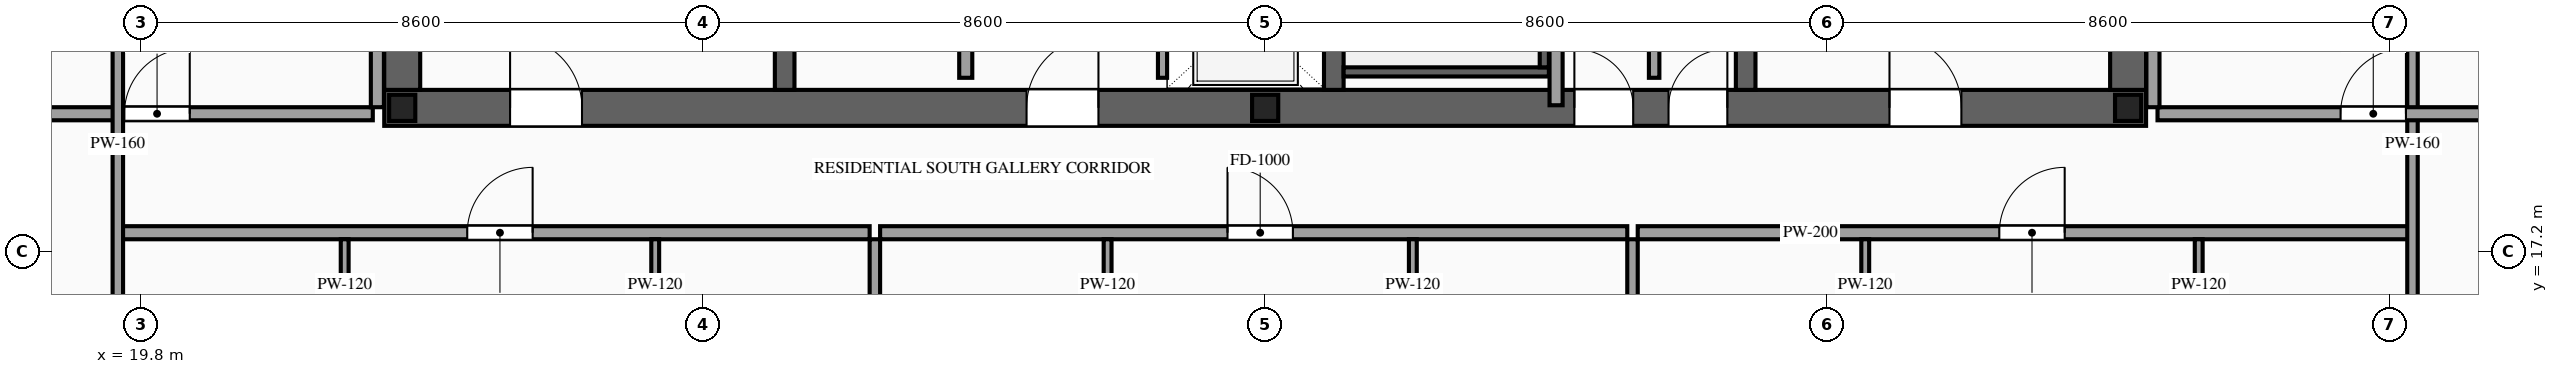
"""IFC4 building model, lengths in metres.
Left out: names, types, materials, properties, quantities, classifications, styles, units other than length and angle.
Written with IfcOpenShell. Run it as: python <this file> out.ifc"""

import sys

from ifc_helpers import new_model, si_unit, direction, frame, frame_2d, origin, origin_2d, place, context, subcontext, project, spatial, rectangle, i_section, extrude, source, transform, mapped, element, fill, save


model = new_model("IFC4")
c1 = context("Model", 3, precision=1e-05, world=origin(), true_north=direction((0.0, 1.0)))
c2 = subcontext(c1, "Body", "Model", "MODEL_VIEW")
j1 = project(units=[si_unit("LENGTHUNIT", "METRE"), si_unit("PLANEANGLEUNIT", "RADIAN")], contexts=[c1])
p1 = place(None, origin())
s1 = spatial("IfcSite", under=j1, at=p1, CompositionType="ELEMENT")
p2 = place(p1, origin())
s2 = spatial("IfcBuilding", under=s1, at=p2, CompositionType="ELEMENT")
p3 = place(p2, frame((0.0, 0.0, 241.6)))
s3 = spatial("IfcBuildingStorey", under=s2, at=p3, CompositionType="ELEMENT", Elevation=241.6)
p4 = place(p3, frame((23.525, 19.4, 0.0), z_axis=(0.0, 0.0, 1.0), x_axis=(1.0, 0.0, 0.0)))
e1 = element("IfcWall", 1, at=p4, inside=s3, PredefinedType="SHEAR", context=c2, shape_type="SweptSolid", body=[
    extrude(rectangle(XDim=26.95, YDim=0.55, at=frame_2d((13.475, 0.0))), origin(), (0.0, 0.0, 1.0), 3.5),
])
p5 = place(p4, frame((1.925, 0.0, 0.0)))
e2 = element("IfcOpeningElement", 2, at=p5, cuts=e1, PredefinedType="OPENING", context=c2, shape_type="SweptSolid", body=[
    extrude(rectangle(XDim=1.1, YDim=2.2, at=frame_2d((0.55, 1.1))), frame((0.0, 0.29, 0.0), z_axis=(0.0, -1.0, 0.0), x_axis=(1.0, 0.0, 0.0)), (0.0, 0.0, 1.0), 0.58),
])
p6 = place(p4, frame((9.825, 0.0, 0.0)))
e3 = element("IfcOpeningElement", 3, at=p6, cuts=e1, PredefinedType="OPENING", context=c2, shape_type="SweptSolid", body=[
    extrude(rectangle(XDim=1.1, YDim=2.2, at=frame_2d((0.55, 1.1))), frame((0.0, 0.29, 0.0), z_axis=(0.0, -1.0, 0.0), x_axis=(1.0, 0.0, 0.0)), (0.0, 0.0, 1.0), 0.58),
])
p7 = place(p4, frame((23.025, 0.0, 0.0)))
e4 = element("IfcOpeningElement", 4, at=p7, cuts=e1, PredefinedType="OPENING", context=c2, shape_type="SweptSolid", body=[
    extrude(rectangle(XDim=1.1, YDim=2.2, at=frame_2d((0.55, 1.1))), frame((0.0, 0.29, 0.0), z_axis=(0.0, -1.0, 0.0), x_axis=(1.0, 0.0, 0.0)), (0.0, 0.0, 1.0), 0.58),
])
p8 = place(p4, frame((19.645, 0.0, 0.0)))
e5 = element("IfcOpeningElement", 5, at=p8, cuts=e1, PredefinedType="OPENING", context=c2, shape_type="SweptSolid", body=[
    extrude(rectangle(XDim=0.9, YDim=2.15, at=frame_2d((0.45, 1.075))), frame((0.0, 0.29, 0.0), z_axis=(0.0, -1.0, 0.0), x_axis=(1.0, 0.0, 0.0)), (0.0, 0.0, 1.0), 0.58),
])
p9 = place(p4, frame((18.205, 0.0, 0.0)))
e6 = element("IfcOpeningElement", 6, at=p9, cuts=e1, PredefinedType="OPENING", context=c2, shape_type="SweptSolid", body=[
    extrude(rectangle(XDim=0.9, YDim=2.15, at=frame_2d((0.45, 1.075))), frame((0.0, 0.29, 0.0), z_axis=(0.0, -1.0, 0.0), x_axis=(1.0, 0.0, 0.0)), (0.0, 0.0, 1.0), 0.58),
])
m1 = source(origin(), c2, "Body", "SweptSolid", [
    extrude(rectangle(XDim=12.25, YDim=0.55, at=frame_2d((6.125, 0.0))), origin(), (0.0, 0.0, 1.0), 3.5),
])
for number, where, z_axis, x_axis in (
    (7, (23.8, 19.675, 0.0), (0.0, 0.0, 1.0), (0.0, 1.0, 0.0)),
    (8, (50.2, 19.675, 0.0), (0.0, 0.0, 1.0), (0.0, 1.0, 0.0)),
):
    element("IfcWall", number, at=place(p3, frame(where, z_axis=z_axis, x_axis=x_axis)), inside=s3, PredefinedType="SHEAR", context=c2, shape_type="MappedRepresentation", body=[
        mapped(m1, transform((0.0, 0.0, 0.0), scale=1.0)),
    ])
m2 = source(origin(), c2, "Body", "SweptSolid", [
    extrude(rectangle(XDim=12.25, YDim=0.3, at=frame_2d((6.125, 0.0))), origin(), (0.0, 0.0, 1.0), 3.5),
])
for number, where, z_axis, x_axis in (
    (9, (29.65, 19.675, 0.0), (0.0, 0.0, 1.0), (0.0, 1.0, 0.0)),
    (10, (38.05, 19.675, 0.0), (0.0, 0.0, 1.0), (0.0, 1.0, 0.0)),
    (11, (44.35, 19.675, 0.0), (0.0, 0.0, 1.0), (0.0, 1.0, 0.0)),
):
    element("IfcWall", number, at=place(p3, frame(where, z_axis=z_axis, x_axis=x_axis)), inside=s3, PredefinedType="SOLIDWALL", context=c2, shape_type="MappedRepresentation", body=[
        mapped(m2, transform((0.0, 0.0, 0.0), scale=1.0)),
    ])
m3 = source(origin(), c2, "Body", "SweptSolid", [
    extrude(i_section(OverallWidth=0.4, OverallDepth=0.4, WebThickness=0.013, FlangeThickness=0.021, at=origin_2d()), origin(), (0.0, 0.0, 1.0), 3.5),
])
for number, where, z_axis, x_axis in (
    (12, (23.8, 19.4, 0.0), (0.0, 0.0, 1.0), (1.0, 0.0, 0.0)),
    (13, (37.0, 19.4, 0.0), (0.0, 0.0, 1.0), (1.0, 0.0, 0.0)),
    (14, (50.2, 19.4, 0.0), (0.0, 0.0, 1.0), (1.0, 0.0, 0.0)),
):
    element("IfcColumn", number, at=place(p3, frame(where, z_axis=z_axis, x_axis=x_axis)), inside=s3, PredefinedType="COLUMN", context=c2, shape_type="MappedRepresentation", body=[
        mapped(m3, transform((0.0, 0.0, 0.0), scale=1.0)),
    ])
p10 = place(p3, frame((35.43, 19.86, 0.0), z_axis=(0.0, 0.0, 1.0), x_axis=(0.0, 1.0, 0.0)))
e15 = element("IfcWall", 15, at=p10, inside=s3, PredefinedType="SOLIDWALL", context=c2, shape_type="SweptSolid", body=[
    extrude(rectangle(XDim=2.04, YDim=0.14, at=frame_2d((1.02, 0.0))), origin(), (0.0, 0.0, 1.0), 3.28),
])
p11 = place(p10, frame((0.47, 0.0, 0.0)))
e16 = element("IfcOpeningElement", 16, at=p11, cuts=e15, PredefinedType="OPENING", context=c2, shape_type="SweptSolid", body=[
    extrude(rectangle(XDim=1.1, YDim=2.2, at=frame_2d((0.55, 1.1))), frame((0.0, 0.085, 0.0), z_axis=(0.0, -1.0, 0.0), x_axis=(1.0, 0.0, 0.0)), (0.0, 0.0, 1.0), 0.17),
])
m4 = source(origin(), c2, "Body", "SweptSolid", [
    extrude(rectangle(XDim=3.14, YDim=0.14, at=frame_2d((1.57, 0.0))), origin(), (0.0, 0.0, 1.0), 3.28),
])
p12 = place(p3, frame((38.2, 19.95, 0.0), z_axis=(0.0, 0.0, 1.0), x_axis=(1.0, 0.0, 0.0)))
e17 = element("IfcWall", 17, at=p12, inside=s3, PredefinedType="SOLIDWALL", context=c2, shape_type="MappedRepresentation", body=[
    mapped(m4, transform((0.0, 0.0, 0.0), scale=1.0)),
])
m5 = source(origin(), c2, "Body", "SweptSolid", [
    extrude(rectangle(XDim=8.94, YDim=0.14, at=frame_2d((4.47, 0.0))), origin(), (0.0, 0.0, 1.0), 3.28),
])
p13 = place(p3, frame((41.27, 20.02, 0.0), z_axis=(0.0, 0.0, 1.0), x_axis=(0.0, 1.0, 0.0)))
e18 = element("IfcWall", 18, at=p13, inside=s3, PredefinedType="SOLIDWALL", context=c2, shape_type="MappedRepresentation", body=[
    mapped(m5, transform((0.0, 0.0, 0.0), scale=1.0)),
])
p14 = place(p3, frame((32.42, 19.86, 0.0), z_axis=(0.0, 0.0, 1.0), x_axis=(0.0, 1.0, 0.0)))
e19 = element("IfcWall", 19, at=p14, inside=s3, PredefinedType="PARTITIONING", context=c2, shape_type="SweptSolid", body=[
    extrude(rectangle(XDim=7.94, YDim=0.2, at=frame_2d((3.97, 0.0))), origin(), (0.0, 0.0, 1.0), 3.28),
])
p15 = place(p14, frame((3.52, 0.0, 0.0)))
e20 = element("IfcOpeningElement", 20, at=p15, cuts=e19, PredefinedType="OPENING", context=c2, shape_type="SweptSolid", body=[
    extrude(rectangle(XDim=0.9, YDim=2.15, at=frame_2d((0.45, 1.075))), frame((0.0, 0.115, 0.0), z_axis=(0.0, -1.0, 0.0), x_axis=(1.0, 0.0, 0.0)), (0.0, 0.0, 1.0), 0.23),
])
m6 = source(origin(), c2, "Body", "SweptSolid", [
    extrude(rectangle(XDim=1.34, YDim=0.16, at=frame_2d((0.67, 0.0))), origin(), (0.0, 0.0, 1.0), 3.28),
])
p16 = place(p3, frame((42.95, 19.86, 0.0), z_axis=(0.0, 0.0, 1.0), x_axis=(0.0, 1.0, 0.0)))
e21 = element("IfcWall", 21, at=p16, inside=s3, PredefinedType="PARTITIONING", context=c2, shape_type="MappedRepresentation", body=[
    mapped(m6, transform((0.0, 0.0, 0.0), scale=1.0)),
])
m7 = source(origin(), c2, "Body", "SweptSolid", [
    extrude(rectangle(XDim=6.51, YDim=0.2, at=frame_2d((3.255, 0.0))), origin(), (0.0, 0.0, 1.0), 3.28),
])
p17 = place(p3, frame((41.45, 19.44, 0.0), z_axis=(0.0, 0.0, 1.0), x_axis=(0.0, 1.0, 0.0)))
e22 = element("IfcWall", 22, at=p17, inside=s3, PredefinedType="PARTITIONING", context=c2, shape_type="MappedRepresentation", body=[
    mapped(m7, transform((0.0, 0.0, 0.0), scale=1.0)),
])
p18 = place(p3, frame((19.44, 17.49, 0.0), z_axis=(0.0, 0.0, 1.0), x_axis=(1.0, 0.0, 0.0)))
e23 = element("IfcWall", 23, at=p18, inside=s3, PredefinedType="PARTITIONING", context=c2, shape_type="SweptSolid", body=[
    extrude(rectangle(XDim=11.51, YDim=0.2, at=frame_2d((5.755, 0.0))), origin(), (0.0, 0.0, 1.0), 3.28),
])
p19 = place(p18, frame((5.355, 0.0, 0.0)))
e24 = element("IfcOpeningElement", 24, at=p19, cuts=e23, PredefinedType="OPENING", context=c2, shape_type="SweptSolid", body=[
    extrude(rectangle(XDim=1.0, YDim=2.2, at=frame_2d((0.5, 1.1))), frame((0.0, 0.115, 0.0), z_axis=(0.0, -1.0, 0.0), x_axis=(1.0, 0.0, 0.0)), (0.0, 0.0, 1.0), 0.23),
])
m8 = source(origin(), c2, "Body", "SweptSolid", [
    extrude(rectangle(XDim=12.04, YDim=0.16, at=frame_2d((6.02, 0.0))), origin(), (0.0, 0.0, 1.0), 3.28),
])
p20 = place(p3, frame((31.03, 5.35, 0.0), z_axis=(0.0, 0.0, 1.0), x_axis=(0.0, 1.0, 0.0)))
e25 = element("IfcWall", 25, at=p20, inside=s3, PredefinedType="PARTITIONING", context=c2, shape_type="MappedRepresentation", body=[
    mapped(m8, transform((0.0, 0.0, 0.0), scale=1.0)),
])
p21 = place(p3, frame((22.92, 13.28, 0.0), z_axis=(0.0, 0.0, 1.0), x_axis=(0.0, 1.0, 0.0)))
e26 = element("IfcWall", 26, at=p21, inside=s3, PredefinedType="PARTITIONING", context=c2, shape_type="SweptSolid", body=[
    extrude(rectangle(XDim=4.11, YDim=0.12, at=frame_2d((2.055, 0.0))), origin(), (0.0, 0.0, 1.0), 3.28),
])
p22 = place(p21, frame((1.63, 0.0, 0.0)))
e27 = element("IfcOpeningElement", 27, at=p22, cuts=e26, PredefinedType="OPENING", context=c2, shape_type="SweptSolid", body=[
    extrude(rectangle(XDim=0.85, YDim=2.1, at=frame_2d((0.425, 1.05))), frame((0.0, 0.075, 0.0), z_axis=(0.0, -1.0, 0.0), x_axis=(1.0, 0.0, 0.0)), (0.0, 0.0, 1.0), 0.15),
])
p23 = place(p3, frame((27.67, 13.28, 0.0), z_axis=(0.0, 0.0, 1.0), x_axis=(0.0, 1.0, 0.0)))
e28 = element("IfcWall", 28, at=p23, inside=s3, PredefinedType="PARTITIONING", context=c2, shape_type="SweptSolid", body=[
    extrude(rectangle(XDim=4.11, YDim=0.12, at=frame_2d((2.055, 0.0))), origin(), (0.0, 0.0, 1.0), 3.28),
])
p24 = place(p23, frame((1.63, 0.0, 0.0)))
e29 = element("IfcOpeningElement", 29, at=p24, cuts=e28, PredefinedType="OPENING", context=c2, shape_type="SweptSolid", body=[
    extrude(rectangle(XDim=0.85, YDim=2.1, at=frame_2d((0.425, 1.05))), frame((0.0, 0.075, 0.0), z_axis=(0.0, -1.0, 0.0), x_axis=(1.0, 0.0, 0.0)), (0.0, 0.0, 1.0), 0.15),
])
p25 = place(p3, frame((31.11, 17.49, 0.0), z_axis=(0.0, 0.0, 1.0), x_axis=(1.0, 0.0, 0.0)))
e30 = element("IfcWall", 30, at=p25, inside=s3, PredefinedType="PARTITIONING", context=c2, shape_type="SweptSolid", body=[
    extrude(rectangle(XDim=11.429, YDim=0.2, at=frame_2d((5.714, 0.0))), origin(), (0.0, 0.0, 1.0), 3.28),
])
p26 = place(p25, frame((5.314, 0.0, 0.0)))
e31 = element("IfcOpeningElement", 31, at=p26, cuts=e30, PredefinedType="OPENING", context=c2, shape_type="SweptSolid", body=[
    extrude(rectangle(XDim=1.0, YDim=2.2, at=frame_2d((0.5, 1.1))), frame((0.0, 0.115, 0.0), z_axis=(0.0, -1.0, 0.0), x_axis=(1.0, 0.0, 0.0)), (0.0, 0.0, 1.0), 0.23),
])
p27 = place(p3, frame((42.619, 5.35, 0.0), z_axis=(0.0, 0.0, 1.0), x_axis=(0.0, 1.0, 0.0)))
e32 = element("IfcWall", 32, at=p27, inside=s3, PredefinedType="PARTITIONING", context=c2, shape_type="MappedRepresentation", body=[
    mapped(m8, transform((0.0, 0.0, 0.0), scale=1.0)),
])
p28 = place(p3, frame((34.59, 13.28, 0.0), z_axis=(0.0, 0.0, 1.0), x_axis=(0.0, 1.0, 0.0)))
e33 = element("IfcWall", 33, at=p28, inside=s3, PredefinedType="PARTITIONING", context=c2, shape_type="SweptSolid", body=[
    extrude(rectangle(XDim=4.11, YDim=0.12, at=frame_2d((2.055, 0.0))), origin(), (0.0, 0.0, 1.0), 3.28),
])
p29 = place(p28, frame((1.63, 0.0, 0.0)))
e34 = element("IfcOpeningElement", 34, at=p29, cuts=e33, PredefinedType="OPENING", context=c2, shape_type="SweptSolid", body=[
    extrude(rectangle(XDim=0.85, YDim=2.1, at=frame_2d((0.425, 1.05))), frame((0.0, 0.075, 0.0), z_axis=(0.0, -1.0, 0.0), x_axis=(1.0, 0.0, 0.0)), (0.0, 0.0, 1.0), 0.15),
])
p30 = place(p3, frame((39.259, 13.28, 0.0), z_axis=(0.0, 0.0, 1.0), x_axis=(0.0, 1.0, 0.0)))
e35 = element("IfcWall", 35, at=p30, inside=s3, PredefinedType="PARTITIONING", context=c2, shape_type="SweptSolid", body=[
    extrude(rectangle(XDim=4.11, YDim=0.12, at=frame_2d((2.055, 0.0))), origin(), (0.0, 0.0, 1.0), 3.28),
])
p31 = place(p30, frame((1.63, 0.0, 0.0)))
e36 = element("IfcOpeningElement", 36, at=p31, cuts=e35, PredefinedType="OPENING", context=c2, shape_type="SweptSolid", body=[
    extrude(rectangle(XDim=0.85, YDim=2.1, at=frame_2d((0.425, 1.05))), frame((0.0, 0.075, 0.0), z_axis=(0.0, -1.0, 0.0), x_axis=(1.0, 0.0, 0.0)), (0.0, 0.0, 1.0), 0.15),
])
p32 = place(p3, frame((42.699, 17.49, 0.0), z_axis=(0.0, 0.0, 1.0), x_axis=(1.0, 0.0, 0.0)))
e37 = element("IfcWall", 37, at=p32, inside=s3, PredefinedType="PARTITIONING", context=c2, shape_type="SweptSolid", body=[
    extrude(rectangle(XDim=11.861, YDim=0.2, at=frame_2d((5.931, 0.0))), origin(), (0.0, 0.0, 1.0), 3.28),
])
p33 = place(p32, frame((5.531, 0.0, 0.0)))
e38 = element("IfcOpeningElement", 38, at=p33, cuts=e37, PredefinedType="OPENING", context=c2, shape_type="SweptSolid", body=[
    extrude(rectangle(XDim=1.0, YDim=2.2, at=frame_2d((0.5, 1.1))), frame((0.0, 0.115, 0.0), z_axis=(0.0, -1.0, 0.0), x_axis=(1.0, 0.0, 0.0)), (0.0, 0.0, 1.0), 0.23),
])
p34 = place(p3, frame((46.179, 13.28, 0.0), z_axis=(0.0, 0.0, 1.0), x_axis=(0.0, 1.0, 0.0)))
e39 = element("IfcWall", 39, at=p34, inside=s3, PredefinedType="PARTITIONING", context=c2, shape_type="SweptSolid", body=[
    extrude(rectangle(XDim=4.11, YDim=0.12, at=frame_2d((2.055, 0.0))), origin(), (0.0, 0.0, 1.0), 3.28),
])
p35 = place(p34, frame((1.63, 0.0, 0.0)))
e40 = element("IfcOpeningElement", 40, at=p35, cuts=e39, PredefinedType="OPENING", context=c2, shape_type="SweptSolid", body=[
    extrude(rectangle(XDim=0.85, YDim=2.1, at=frame_2d((0.425, 1.05))), frame((0.0, 0.075, 0.0), z_axis=(0.0, -1.0, 0.0), x_axis=(1.0, 0.0, 0.0)), (0.0, 0.0, 1.0), 0.15),
])
p36 = place(p3, frame((51.28, 13.28, 0.0), z_axis=(0.0, 0.0, 1.0), x_axis=(0.0, 1.0, 0.0)))
e41 = element("IfcWall", 41, at=p36, inside=s3, PredefinedType="PARTITIONING", context=c2, shape_type="SweptSolid", body=[
    extrude(rectangle(XDim=4.11, YDim=0.12, at=frame_2d((2.055, 0.0))), origin(), (0.0, 0.0, 1.0), 3.28),
])
p37 = place(p36, frame((1.63, 0.0, 0.0)))
e42 = element("IfcOpeningElement", 42, at=p37, cuts=e41, PredefinedType="OPENING", context=c2, shape_type="SweptSolid", body=[
    extrude(rectangle(XDim=0.85, YDim=2.1, at=frame_2d((0.425, 1.05))), frame((0.0, 0.075, 0.0), z_axis=(0.0, -1.0, 0.0), x_axis=(1.0, 0.0, 0.0)), (0.0, 0.0, 1.0), 0.15),
])
p38 = place(p3, frame((16.55, 19.31, 0.0), z_axis=(0.0, 0.0, 1.0), x_axis=(1.0, 0.0, 0.0)))
e43 = element("IfcWall", 43, at=p38, inside=s3, PredefinedType="PARTITIONING", context=c2, shape_type="SweptSolid", body=[
    extrude(rectangle(XDim=6.8, YDim=0.2, at=frame_2d((3.4, 0.0))), origin(), (0.0, 0.0, 1.0), 2.825),
])
p39 = place(p38, frame((3.0, 0.0, 0.0)))
e44 = element("IfcOpeningElement", 44, at=p39, cuts=e43, PredefinedType="OPENING", context=c2, shape_type="SweptSolid", body=[
    extrude(rectangle(XDim=1.0, YDim=2.2, at=frame_2d((0.5, 1.1))), frame((0.0, 0.115, 0.0), z_axis=(0.0, -1.0, 0.0), x_axis=(1.0, 0.0, 0.0)), (0.0, 0.0, 1.0), 0.23),
])
m9 = source(origin(), c2, "Body", "SweptSolid", [
    extrude(rectangle(XDim=6.29, YDim=0.2, at=frame_2d((3.145, 0.0))), origin(), (0.0, 0.0, 1.0), 3.28),
])
p40 = place(p3, frame((23.42, 19.41, 0.0), z_axis=(0.0, 0.0, 1.0), x_axis=(0.0, 1.0, 0.0)))
e45 = element("IfcWall", 45, at=p40, inside=s3, PredefinedType="PARTITIONING", context=c2, shape_type="MappedRepresentation", body=[
    mapped(m9, transform((0.0, 0.0, 0.0), scale=1.0)),
])
m10 = source(origin(), c2, "Body", "SweptSolid", [
    extrude(rectangle(XDim=26.69, YDim=0.16, at=frame_2d((13.345, 0.0))), origin(), (0.0, 0.0, 1.0), 3.28),
])
for number, where, z_axis, x_axis in (
    (46, (19.45, 5.5, 0.0), (0.0, 0.0, 1.0), (0.0, 1.0, 0.0)),
    (47, (54.55, 5.5, 0.0), (0.0, 0.0, 1.0), (0.0, 1.0, 0.0)),
):
    element("IfcWall", number, at=place(p3, frame(where, z_axis=z_axis, x_axis=x_axis)), inside=s3, PredefinedType="PARTITIONING", context=c2, shape_type="MappedRepresentation", body=[
        mapped(m10, transform((0.0, 0.0, 0.0), scale=1.0)),
    ])
p41 = place(p3, frame((50.65, 19.31, 0.0), z_axis=(0.0, 0.0, 1.0), x_axis=(1.0, 0.0, 0.0)))
e48 = element("IfcWall", 48, at=p41, inside=s3, PredefinedType="PARTITIONING", context=c2, shape_type="SweptSolid", body=[
    extrude(rectangle(XDim=6.8, YDim=0.2, at=frame_2d((3.4, 0.0))), origin(), (0.0, 0.0, 1.0), 2.825),
])
p42 = place(p41, frame((2.8, 0.0, 0.0)))
e49 = element("IfcOpeningElement", 49, at=p42, cuts=e48, PredefinedType="OPENING", context=c2, shape_type="SweptSolid", body=[
    extrude(rectangle(XDim=1.0, YDim=2.2, at=frame_2d((0.5, 1.1))), frame((0.0, 0.115, 0.0), z_axis=(0.0, -1.0, 0.0), x_axis=(1.0, 0.0, 0.0)), (0.0, 0.0, 1.0), 0.23),
])
p43 = place(p3, frame((50.58, 19.41, 0.0), z_axis=(0.0, 0.0, 1.0), x_axis=(0.0, 1.0, 0.0)))
e50 = element("IfcWall", 50, at=p43, inside=s3, PredefinedType="PARTITIONING", context=c2, shape_type="MappedRepresentation", body=[
    mapped(m9, transform((0.0, 0.0, 0.0), scale=1.0)),
])
m11 = source(origin(), c2, "Body", "SweptSolid", [
    extrude(rectangle(XDim=1.1, YDim=2.2, at=frame_2d((0.55, 1.1))), frame((0.0, 0.025, 0.0), z_axis=(0.0, -1.0, 0.0), x_axis=(1.0, 0.0, 0.0)), (0.0, 0.0, 1.0), 0.05),
])
p44 = place(p5, origin())
e51 = element("IfcDoor", 51, at=p44, inside=s3, OperationType="SINGLE_SWING_LEFT", PredefinedType="DOOR", context=c2, shape_type="MappedRepresentation", body=[
    mapped(m11, transform((0.0, 0.0, 0.0), scale=1.0)),
])
fill(e2, e51)
p45 = place(p6, origin())
e52 = element("IfcDoor", 52, at=p45, inside=s3, OperationType="SINGLE_SWING_RIGHT", PredefinedType="DOOR", context=c2, shape_type="MappedRepresentation", body=[
    mapped(m11, transform((0.0, 0.0, 0.0), scale=1.0)),
])
fill(e3, e52)
p46 = place(p7, origin())
e53 = element("IfcDoor", 53, at=p46, inside=s3, OperationType="SINGLE_SWING_LEFT", PredefinedType="DOOR", context=c2, shape_type="MappedRepresentation", body=[
    mapped(m11, transform((0.0, 0.0, 0.0), scale=1.0)),
])
fill(e4, e53)
m12 = source(origin(), c2, "Body", "SweptSolid", [
    extrude(rectangle(XDim=0.9, YDim=2.15, at=frame_2d((0.45, 1.075))), frame((0.0, 0.025, 0.0), z_axis=(0.0, -1.0, 0.0), x_axis=(1.0, 0.0, 0.0)), (0.0, 0.0, 1.0), 0.05),
])
p47 = place(p8, origin())
e54 = element("IfcDoor", 54, at=p47, inside=s3, OperationType="SINGLE_SWING_RIGHT", PredefinedType="DOOR", context=c2, shape_type="MappedRepresentation", body=[
    mapped(m12, transform((0.0, 0.0, 0.0), scale=1.0)),
])
fill(e5, e54)
p48 = place(p9, origin())
e55 = element("IfcDoor", 55, at=p48, inside=s3, OperationType="SINGLE_SWING_LEFT", PredefinedType="DOOR", context=c2, shape_type="MappedRepresentation", body=[
    mapped(m12, transform((0.0, 0.0, 0.0), scale=1.0)),
])
fill(e6, e55)
m13 = source(origin(), c2, "Body", "SweptSolid", [
    extrude(rectangle(XDim=1.0, YDim=2.2, at=frame_2d((0.5, 1.1))), frame((0.0, 0.025, 0.0), z_axis=(0.0, -1.0, 0.0), x_axis=(1.0, 0.0, 0.0)), (0.0, 0.0, 1.0), 0.05),
])
p49 = place(p19, origin())
e56 = element("IfcDoor", 56, at=p49, inside=s3, OperationType="SINGLE_SWING_RIGHT", PredefinedType="DOOR", context=c2, shape_type="MappedRepresentation", body=[
    mapped(m13, transform((0.0, 0.0, 0.0), scale=1.0)),
])
fill(e24, e56)
p50 = place(p26, origin())
e57 = element("IfcDoor", 57, at=p50, inside=s3, OperationType="SINGLE_SWING_LEFT", PredefinedType="DOOR", context=c2, shape_type="MappedRepresentation", body=[
    mapped(m13, transform((0.0, 0.0, 0.0), scale=1.0)),
])
fill(e31, e57)
p51 = place(p33, origin())
e58 = element("IfcDoor", 58, at=p51, inside=s3, OperationType="SINGLE_SWING_RIGHT", PredefinedType="DOOR", context=c2, shape_type="MappedRepresentation", body=[
    mapped(m13, transform((0.0, 0.0, 0.0), scale=1.0)),
])
fill(e38, e58)
p52 = place(p39, origin())
e59 = element("IfcDoor", 59, at=p52, inside=s3, OperationType="SINGLE_SWING_RIGHT", PredefinedType="DOOR", context=c2, shape_type="MappedRepresentation", body=[
    mapped(m13, transform((0.0, 0.0, 0.0), scale=1.0)),
])
fill(e44, e59)
p53 = place(p42, origin())
e60 = element("IfcDoor", 60, at=p53, inside=s3, OperationType="SINGLE_SWING_RIGHT", PredefinedType="DOOR", context=c2, shape_type="MappedRepresentation", body=[
    mapped(m13, transform((0.0, 0.0, 0.0), scale=1.0)),
])
fill(e49, e60)
save(model, sys.argv[1])
